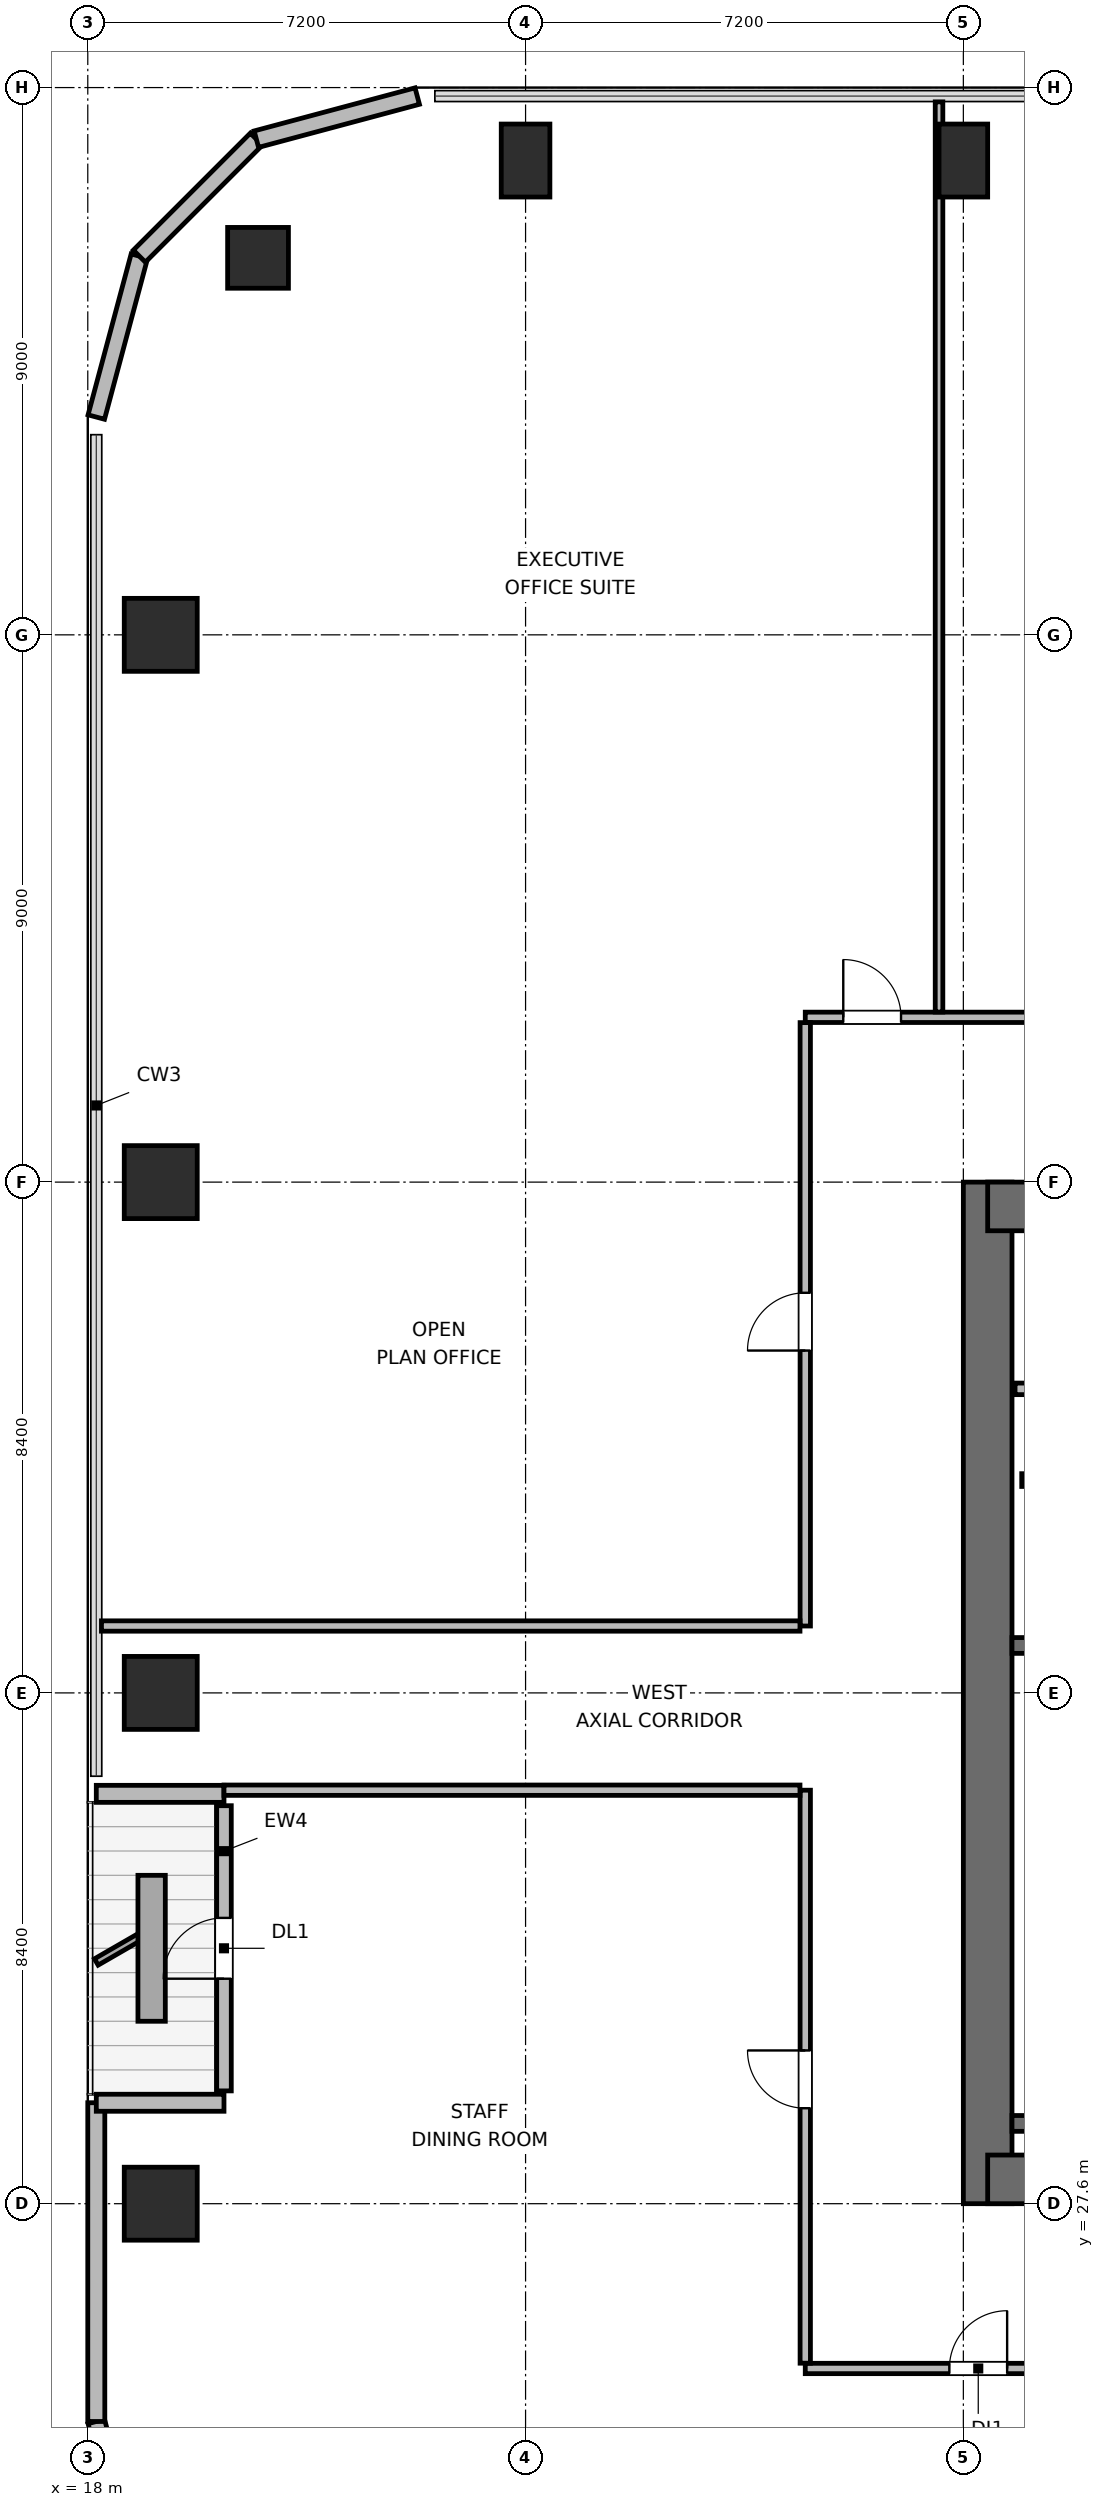
"""IFC4 building model, lengths in metres.
Left out: names, types, materials, properties, quantities, classifications, styles, units other than length and angle.
Written with IfcOpenShell. Run it as: python <this file> out.ifc"""

import sys

from ifc_helpers import new_model, si_unit, direction, frame, frame_2d, origin, origin_2d, place, context, subcontext, project, spatial, rectangle, circle, extrude, element, fill, save


model = new_model("IFC4")
c1 = context("Model", 3, precision=1e-05, world=origin(), true_north=direction((0.0, 1.0)))
c2 = subcontext(c1, "Body", "Model", "MODEL_VIEW")
j1 = project(units=[si_unit("LENGTHUNIT", "METRE"), si_unit("PLANEANGLEUNIT", "RADIAN")], contexts=[c1])
p1 = place(None, origin())
s1 = spatial("IfcSite", under=j1, at=p1, CompositionType="ELEMENT")
p2 = place(p1, origin())
s2 = spatial("IfcBuilding", under=s1, at=p2, CompositionType="ELEMENT")
p3 = place(p2, frame((0.0, 0.0, 162.3)))
s3 = spatial("IfcBuildingStorey", under=s2, at=p3, CompositionType="ELEMENT", Elevation=162.3)
p4 = place(p3, frame((32.8, 27.6, 0.0), z_axis=(0.0, 0.0, 1.0), x_axis=(0.0, 1.0, 0.0)))
e1 = element("IfcWall", 1, at=p4, inside=s3, PredefinedType="SHEAR", context=c2, shape_type="SweptSolid", body=[
    extrude(rectangle(XDim=16.8, YDim=0.8, at=frame_2d((8.4, 0.0))), origin(), (0.0, 0.0, 1.0), 3.9),
])
p5 = place(p3, frame((32.8, 28.0, 0.0), z_axis=(0.0, 0.0, 1.0), x_axis=(1.0, 0.0, 0.0)))
e2 = element("IfcWall", 2, at=p5, inside=s3, PredefinedType="SHEAR", context=c2, shape_type="SweptSolid", body=[
    extrude(rectangle(XDim=9.2, YDim=0.8, at=frame_2d((4.6, 0.0))), origin(), (0.0, 0.0, 1.0), 3.9),
])
p6 = place(p5, frame((5.025, 0.0, 0.0)))
e3 = element("IfcOpeningElement", 3, at=p6, cuts=e2, PredefinedType="OPENING", context=c2, shape_type="SweptSolid", body=[
    extrude(rectangle(XDim=1.05, YDim=2.04, at=frame_2d((0.525, 1.02))), frame((0.0, 0.41, 0.0), z_axis=(0.0, -1.0, 0.0), x_axis=(1.0, 0.0, 0.0)), (0.0, 0.0, 1.0), 0.82),
])
p7 = place(p3, frame((32.8, 44.0, 0.0), z_axis=(0.0, 0.0, 1.0), x_axis=(1.0, 0.0, 0.0)))
e4 = element("IfcWall", 4, at=p7, inside=s3, PredefinedType="SHEAR", context=c2, shape_type="SweptSolid", body=[
    extrude(rectangle(XDim=9.2, YDim=0.8, at=frame_2d((4.6, 0.0))), origin(), (0.0, 0.0, 1.0), 3.9),
])
p8 = place(p7, frame((1.025, 0.0, 0.0)))
e5 = element("IfcOpeningElement", 5, at=p8, cuts=e4, PredefinedType="OPENING", context=c2, shape_type="SweptSolid", body=[
    extrude(rectangle(XDim=0.95, YDim=2.04, at=frame_2d((0.475, 1.02))), frame((0.0, 0.41, 0.0), z_axis=(0.0, -1.0, 0.0), x_axis=(1.0, 0.0, 0.0)), (0.0, 0.0, 1.0), 0.82),
])
p9 = place(p7, frame((4.275, 0.0, 0.0)))
e6 = element("IfcOpeningElement", 6, at=p9, cuts=e4, PredefinedType="OPENING", context=c2, shape_type="SweptSolid", body=[
    extrude(rectangle(XDim=0.9, YDim=2.02, at=frame_2d((0.45, 1.01))), frame((0.0, 0.41, 0.0), z_axis=(0.0, -1.0, 0.0), x_axis=(1.0, 0.0, 0.0)), (0.0, 0.0, 1.0), 0.82),
])
p10 = place(p7, frame((7.175, 0.0, 0.0)))
e7 = element("IfcOpeningElement", 7, at=p10, cuts=e4, PredefinedType="OPENING", context=c2, shape_type="SweptSolid", body=[
    extrude(rectangle(XDim=0.9, YDim=2.02, at=frame_2d((0.45, 1.01))), frame((0.0, 0.41, 0.0), z_axis=(0.0, -1.0, 0.0), x_axis=(1.0, 0.0, 0.0)), (0.0, 0.0, 1.0), 0.82),
])
for number, where, z_axis, x_axis in (
    (8, (33.2, 28.92, 0.0), (0.0, 0.0, 1.0), (1.0, 0.0, 0.0)),
    (9, (33.2, 36.78, 0.0), (0.0, 0.0, 1.0), (1.0, 0.0, 0.0)),
):
    element("IfcWall", number, at=place(p3, frame(where, z_axis=z_axis, x_axis=x_axis)), inside=s3, PredefinedType="SHEAR", context=c2, shape_type="SweptSolid", body=[
        extrude(rectangle(XDim=3.91, YDim=0.26, at=frame_2d((1.955, 0.0))), origin(), (0.0, 0.0, 1.0), 3.9),
    ])
p11 = place(p3, frame((20.8, 59.6, 0.0), z_axis=(0.0, 0.0, 1.0), x_axis=(1.0, 0.0, 0.0)))
e10 = element("IfcColumn", 10, at=p11, inside=s3, PredefinedType="COLUMN", context=c2, shape_type="SweptSolid", body=[
    extrude(circle(Radius=0.5, at=origin_2d()), origin(), (0.0, 0.0, 1.0), 3.9),
])
for number, where, z_axis, x_axis in (
    (11, (25.2, 61.2, 0.0), (0.0, 0.0, 1.0), (1.0, 0.0, 0.0)),
    (12, (32.4, 61.2, 0.0), (0.0, 0.0, 1.0), (1.0, 0.0, 0.0)),
):
    element("IfcColumn", number, at=place(p3, frame(where, z_axis=z_axis, x_axis=x_axis)), inside=s3, PredefinedType="COLUMN", context=c2, shape_type="SweptSolid", body=[
        extrude(rectangle(XDim=0.8, YDim=1.2, at=origin_2d()), origin(), (0.0, 0.0, 1.0), 3.9),
    ])
for number, where, z_axis, x_axis in (
    (13, (19.2, 27.6, 0.0), (0.0, 0.0, 1.0), (1.0, 0.0, 0.0)),
    (14, (19.2, 36.0, 0.0), (0.0, 0.0, 1.0), (1.0, 0.0, 0.0)),
    (15, (19.2, 44.4, 0.0), (0.0, 0.0, 1.0), (1.0, 0.0, 0.0)),
    (16, (19.2, 53.4, 0.0), (0.0, 0.0, 1.0), (1.0, 0.0, 0.0)),
):
    element("IfcColumn", number, at=place(p3, frame(where, z_axis=z_axis, x_axis=x_axis)), inside=s3, PredefinedType="COLUMN", context=c2, shape_type="SweptSolid", body=[
        extrude(rectangle(XDim=1.2, YDim=1.2, at=origin_2d()), origin(), (0.0, 0.0, 1.0), 3.9),
    ])
p12 = place(p3, frame((18.848, 21.373, 0.0), z_axis=(0.0, 0.0, 1.0), x_axis=(-0.258672222976, 0.9659651552, 0.0)))
e17 = element("IfcWall", 17, at=p12, inside=s3, PredefinedType="SOLIDWALL", context=c2, shape_type="SweptSolid", body=[
    extrude(rectangle(XDim=2.739, YDim=0.28, at=frame_2d((1.37, 0.0))), origin(), (0.0, 0.0, 1.0), 3.68),
])
p13 = place(p3, frame((18.14, 24.018, 0.0), z_axis=(0.0, 0.0, 1.0), x_axis=(0.0, 1.0, 0.0)))
e18 = element("IfcWall", 18, at=p13, inside=s3, PredefinedType="SOLIDWALL", context=c2, shape_type="SweptSolid", body=[
    extrude(rectangle(XDim=5.242, YDim=0.28, at=frame_2d((2.621, 0.0))), origin(), (0.0, 0.0, 1.0), 3.68),
])
p14 = place(p3, frame((18.14, 29.26, 0.0), z_axis=(0.0, 0.0, 1.0), x_axis=(1.0, 0.0, 0.0)))
e19 = element("IfcWall", 19, at=p14, inside=s3, PredefinedType="SOLIDWALL", context=c2, shape_type="SweptSolid", body=[
    extrude(rectangle(XDim=2.1, YDim=0.28, at=frame_2d((1.05, 0.0))), origin(), (0.0, 0.0, 1.0), 3.116),
])
p15 = place(p3, frame((20.24, 29.455, 0.0), z_axis=(0.0, 0.0, 1.0), x_axis=(0.0, 1.0, 0.0)))
e20 = element("IfcWall", 20, at=p15, inside=s3, PredefinedType="SOLIDWALL", context=c2, shape_type="SweptSolid", body=[
    extrude(rectangle(XDim=4.69, YDim=0.24, at=frame_2d((2.345, 0.0))), origin(), (0.0, 0.0, 1.0), 3.248),
])
p16 = place(p15, frame((1.845, 0.0, 0.0)))
e21 = element("IfcOpeningElement", 21, at=p16, cuts=e20, PredefinedType="OPENING", context=c2, shape_type="SweptSolid", body=[
    extrude(rectangle(XDim=1.0, YDim=2.02, at=frame_2d((0.5, 1.01))), frame((0.0, 0.13, 0.0), z_axis=(0.0, -1.0, 0.0), x_axis=(1.0, 0.0, 0.0)), (0.0, 0.0, 1.0), 0.26),
])
p17 = place(p3, frame((20.24, 34.34, 0.0), z_axis=(0.0, 0.0, 1.0), x_axis=(-1.0, 0.0, 0.0)))
e22 = element("IfcWall", 22, at=p17, inside=s3, PredefinedType="SOLIDWALL", context=c2, shape_type="SweptSolid", body=[
    extrude(rectangle(XDim=2.1, YDim=0.28, at=frame_2d((1.05, 0.0))), origin(), (0.0, 0.0, 1.0), 3.116),
])
p18 = place(p3, frame((18.14, 56.982, 0.0), z_axis=(0.0, 0.0, 1.0), x_axis=(0.258672222976, 0.9659651552, 0.0)))
e23 = element("IfcWall", 23, at=p18, inside=s3, PredefinedType="SOLIDWALL", context=c2, shape_type="SweptSolid", body=[
    extrude(rectangle(XDim=2.739, YDim=0.28, at=frame_2d((1.37, 0.0))), origin(), (0.0, 0.0, 1.0), 3.68),
])
p19 = place(p3, frame((18.848, 59.627, 0.0), z_axis=(0.0, 0.0, 1.0), x_axis=(0.707106781187, 0.707106781187, 0.0)))
e24 = element("IfcWall", 24, at=p19, inside=s3, PredefinedType="SOLIDWALL", context=c2, shape_type="SweptSolid", body=[
    extrude(rectangle(XDim=2.721, YDim=0.28, at=frame_2d((1.36, 0.0))), origin(), (0.0, 0.0, 1.0), 3.68),
])
p20 = place(p3, frame((20.772, 61.552, 0.0), z_axis=(0.0, 0.0, 1.0), x_axis=(0.965971118627, 0.258649952598, 0.0)))
e25 = element("IfcWall", 25, at=p20, inside=s3, PredefinedType="SOLIDWALL", context=c2, shape_type="SweptSolid", body=[
    extrude(rectangle(XDim=2.739, YDim=0.28, at=frame_2d((1.37, 0.0))), origin(), (0.0, 0.0, 1.0), 3.68),
])
p21 = place(p3, frame((33.25, 41.0, 0.0), z_axis=(0.0, 0.0, 1.0), x_axis=(1.0, 0.0, 0.0)))
e26 = element("IfcWall", 26, at=p21, inside=s3, PredefinedType="PLUMBINGWALL", context=c2, shape_type="SweptSolid", body=[
    extrude(rectangle(XDim=8.3, YDim=0.19, at=frame_2d((4.15, 0.0))), origin(), (0.0, 0.0, 1.0), 3.68),
])
p22 = place(p3, frame((33.36, 39.5, 0.0), z_axis=(0.0, 0.0, 1.0), x_axis=(1.0, 0.0, 0.0)))
e27 = element("IfcWall", 27, at=p22, inside=s3, PredefinedType="PARTITIONING", context=c2, shape_type="SweptSolid", body=[
    extrude(rectangle(XDim=1.86, YDim=0.21, at=frame_2d((0.93, 0.0))), origin(), (0.0, 0.0, 1.0), 3.68),
])
p23 = place(p3, frame((29.8, 24.89, 0.0), z_axis=(0.0, 0.0, 1.0), x_axis=(1.0, 0.0, 0.0)))
e28 = element("IfcWall", 28, at=p23, inside=s3, PredefinedType="PARTITIONING", context=c2, shape_type="SweptSolid", body=[
    extrude(rectangle(XDim=33.8, YDim=0.17, at=frame_2d((16.9, 0.0))), origin(), (0.0, 0.0, 1.0), 3.68),
])
p24 = place(p23, frame((2.37, 0.0, 0.0)))
e29 = element("IfcOpeningElement", 29, at=p24, cuts=e28, PredefinedType="OPENING", context=c2, shape_type="SweptSolid", body=[
    extrude(rectangle(XDim=0.95, YDim=2.04, at=frame_2d((0.475, 1.02))), frame((0.0, 0.095, 0.0), z_axis=(0.0, -1.0, 0.0), x_axis=(1.0, 0.0, 0.0)), (0.0, 0.0, 1.0), 0.19),
])
p25 = place(p23, frame((7.455, 0.0, 0.0)))
e30 = element("IfcOpeningElement", 30, at=p25, cuts=e28, PredefinedType="OPENING", context=c2, shape_type="SweptSolid", body=[
    extrude(rectangle(XDim=0.95, YDim=2.04, at=frame_2d((0.475, 1.02))), frame((0.0, 0.095, 0.0), z_axis=(0.0, -1.0, 0.0), x_axis=(1.0, 0.0, 0.0)), (0.0, 0.0, 1.0), 0.19),
])
p26 = place(p23, frame((11.51, 0.0, 0.0)))
e31 = element("IfcOpeningElement", 31, at=p26, cuts=e28, PredefinedType="OPENING", context=c2, shape_type="SweptSolid", body=[
    extrude(rectangle(XDim=0.95, YDim=2.04, at=frame_2d((0.475, 1.02))), frame((0.0, 0.095, 0.0), z_axis=(0.0, -1.0, 0.0), x_axis=(1.0, 0.0, 0.0)), (0.0, 0.0, 1.0), 0.19),
])
p27 = place(p23, frame((15.995, 0.0, 0.0)))
e32 = element("IfcOpeningElement", 32, at=p27, cuts=e28, PredefinedType="OPENING", context=c2, shape_type="SweptSolid", body=[
    extrude(rectangle(XDim=0.95, YDim=2.04, at=frame_2d((0.475, 1.02))), frame((0.0, 0.095, 0.0), z_axis=(0.0, -1.0, 0.0), x_axis=(1.0, 0.0, 0.0)), (0.0, 0.0, 1.0), 0.19),
])
p28 = place(p23, frame((20.91, 0.0, 0.0)))
e33 = element("IfcOpeningElement", 33, at=p28, cuts=e28, PredefinedType="OPENING", context=c2, shape_type="SweptSolid", body=[
    extrude(rectangle(XDim=0.95, YDim=2.04, at=frame_2d((0.475, 1.02))), frame((0.0, 0.095, 0.0), z_axis=(0.0, -1.0, 0.0), x_axis=(1.0, 0.0, 0.0)), (0.0, 0.0, 1.0), 0.19),
])
p29 = place(p23, frame((25.395, 0.0, 0.0)))
e34 = element("IfcOpeningElement", 34, at=p29, cuts=e28, PredefinedType="OPENING", context=c2, shape_type="SweptSolid", body=[
    extrude(rectangle(XDim=0.95, YDim=2.04, at=frame_2d((0.475, 1.02))), frame((0.0, 0.095, 0.0), z_axis=(0.0, -1.0, 0.0), x_axis=(1.0, 0.0, 0.0)), (0.0, 0.0, 1.0), 0.19),
])
p30 = place(p23, frame((30.48, 0.0, 0.0)))
e35 = element("IfcOpeningElement", 35, at=p30, cuts=e28, PredefinedType="OPENING", context=c2, shape_type="SweptSolid", body=[
    extrude(rectangle(XDim=0.95, YDim=2.04, at=frame_2d((0.475, 1.02))), frame((0.0, 0.095, 0.0), z_axis=(0.0, -1.0, 0.0), x_axis=(1.0, 0.0, 0.0)), (0.0, 0.0, 1.0), 0.19),
])
p31 = place(p3, frame((29.8, 47.11, 0.0), z_axis=(0.0, 0.0, 1.0), x_axis=(1.0, 0.0, 0.0)))
e36 = element("IfcWall", 36, at=p31, inside=s3, PredefinedType="PARTITIONING", context=c2, shape_type="SweptSolid", body=[
    extrude(rectangle(XDim=33.8, YDim=0.17, at=frame_2d((16.9, 0.0))), origin(), (0.0, 0.0, 1.0), 3.68),
])
p32 = place(p31, frame((0.625, 0.0, 0.0)))
e37 = element("IfcOpeningElement", 37, at=p32, cuts=e36, PredefinedType="OPENING", context=c2, shape_type="SweptSolid", body=[
    extrude(rectangle(XDim=0.95, YDim=2.04, at=frame_2d((0.475, 1.02))), frame((0.0, 0.095, 0.0), z_axis=(0.0, -1.0, 0.0), x_axis=(1.0, 0.0, 0.0)), (0.0, 0.0, 1.0), 0.19),
])
p33 = place(p31, frame((6.185, 0.0, 0.0)))
e38 = element("IfcOpeningElement", 38, at=p33, cuts=e36, PredefinedType="OPENING", context=c2, shape_type="SweptSolid", body=[
    extrude(rectangle(XDim=0.95, YDim=2.04, at=frame_2d((0.475, 1.02))), frame((0.0, 0.095, 0.0), z_axis=(0.0, -1.0, 0.0), x_axis=(1.0, 0.0, 0.0)), (0.0, 0.0, 1.0), 0.19),
])
p34 = place(p31, frame((12.465, 0.0, 0.0)))
e39 = element("IfcOpeningElement", 39, at=p34, cuts=e36, PredefinedType="OPENING", context=c2, shape_type="SweptSolid", body=[
    extrude(rectangle(XDim=0.95, YDim=2.04, at=frame_2d((0.475, 1.02))), frame((0.0, 0.095, 0.0), z_axis=(0.0, -1.0, 0.0), x_axis=(1.0, 0.0, 0.0)), (0.0, 0.0, 1.0), 0.19),
])
p35 = place(p31, frame((20.065, 0.0, 0.0)))
e40 = element("IfcOpeningElement", 40, at=p35, cuts=e36, PredefinedType="OPENING", context=c2, shape_type="SweptSolid", body=[
    extrude(rectangle(XDim=0.95, YDim=2.04, at=frame_2d((0.475, 1.02))), frame((0.0, 0.095, 0.0), z_axis=(0.0, -1.0, 0.0), x_axis=(1.0, 0.0, 0.0)), (0.0, 0.0, 1.0), 0.19),
])
p36 = place(p31, frame((29.585, 0.0, 0.0)))
e41 = element("IfcOpeningElement", 41, at=p36, cuts=e36, PredefinedType="OPENING", context=c2, shape_type="SweptSolid", body=[
    extrude(rectangle(XDim=0.95, YDim=2.04, at=frame_2d((0.475, 1.02))), frame((0.0, 0.095, 0.0), z_axis=(0.0, -1.0, 0.0), x_axis=(1.0, 0.0, 0.0)), (0.0, 0.0, 1.0), 0.19),
])
p37 = place(p3, frame((29.8, 24.977, 0.0), z_axis=(0.0, 0.0, 1.0), x_axis=(0.0, 1.0, 0.0)))
e42 = element("IfcWall", 42, at=p37, inside=s3, PredefinedType="PARTITIONING", context=c2, shape_type="SweptSolid", body=[
    extrude(rectangle(XDim=9.423, YDim=0.17, at=frame_2d((4.711, 0.0))), origin(), (0.0, 0.0, 1.0), 3.68),
])
p38 = place(p37, frame((4.193, 0.0, 0.0)))
e43 = element("IfcOpeningElement", 43, at=p38, cuts=e42, PredefinedType="OPENING", context=c2, shape_type="SweptSolid", body=[
    extrude(rectangle(XDim=0.95, YDim=2.04, at=frame_2d((0.475, 1.02))), frame((0.0, 0.095, 0.0), z_axis=(0.0, -1.0, 0.0), x_axis=(1.0, 0.0, 0.0)), (0.0, 0.0, 1.0), 0.19),
])
p39 = place(p3, frame((29.8, 37.1, 0.0), z_axis=(0.0, 0.0, 1.0), x_axis=(0.0, 1.0, 0.0)))
e44 = element("IfcWall", 44, at=p39, inside=s3, PredefinedType="PARTITIONING", context=c2, shape_type="SweptSolid", body=[
    extrude(rectangle(XDim=9.923, YDim=0.17, at=frame_2d((4.961, 0.0))), origin(), (0.0, 0.0, 1.0), 3.68),
])
p40 = place(p39, frame((4.53, 0.0, 0.0)))
e45 = element("IfcOpeningElement", 45, at=p40, cuts=e44, PredefinedType="OPENING", context=c2, shape_type="SweptSolid", body=[
    extrude(rectangle(XDim=0.95, YDim=2.04, at=frame_2d((0.475, 1.02))), frame((0.0, 0.095, 0.0), z_axis=(0.0, -1.0, 0.0), x_axis=(1.0, 0.0, 0.0)), (0.0, 0.0, 1.0), 0.19),
])
p41 = place(p3, frame((32.0, 47.197, 0.0), z_axis=(0.0, 0.0, 1.0), x_axis=(0.0, 1.0, 0.0)))
e46 = element("IfcWall", 46, at=p41, inside=s3, PredefinedType="PARTITIONING", context=c2, shape_type="SweptSolid", body=[
    extrude(rectangle(XDim=14.968, YDim=0.125, at=frame_2d((7.484, 0.0))), origin(), (0.0, 0.0, 1.0), 3.68),
])
p42 = place(p3, frame((20.24, 34.4, 0.0), z_axis=(0.0, 0.0, 1.0), x_axis=(1.0, 0.0, 0.0)))
e47 = element("IfcWall", 47, at=p42, inside=s3, PredefinedType="PARTITIONING", context=c2, shape_type="SweptSolid", body=[
    extrude(rectangle(XDim=9.473, YDim=0.17, at=frame_2d((4.736, 0.0))), origin(), (0.0, 0.0, 1.0), 3.68),
])
p43 = place(p3, frame((18.225, 37.1, 0.0), z_axis=(0.0, 0.0, 1.0), x_axis=(1.0, 0.0, 0.0)))
e48 = element("IfcWall", 48, at=p43, inside=s3, PredefinedType="PARTITIONING", context=c2, shape_type="SweptSolid", body=[
    extrude(rectangle(XDim=11.488, YDim=0.17, at=frame_2d((5.744, 0.0))), origin(), (0.0, 0.0, 1.0), 3.68),
])
p44 = place(p16, origin())
e49 = element("IfcDoor", 49, at=p44, inside=s3, OperationType="SINGLE_SWING_LEFT", PredefinedType="DOOR", context=c2, shape_type="SweptSolid", body=[
    extrude(rectangle(XDim=1.0, YDim=2.02, at=frame_2d((0.5, 1.01))), frame((0.0, 0.025, 0.0), z_axis=(0.0, -1.0, 0.0), x_axis=(1.0, 0.0, 0.0)), (0.0, 0.0, 1.0), 0.05),
])
fill(e21, e49)
p45 = place(p24, origin())
e50 = element("IfcDoor", 50, at=p45, inside=s3, OperationType="SINGLE_SWING_RIGHT", PredefinedType="DOOR", context=c2, shape_type="SweptSolid", body=[
    extrude(rectangle(XDim=0.95, YDim=2.04, at=frame_2d((0.475, 1.02))), frame((0.0, 0.025, 0.0), z_axis=(0.0, -1.0, 0.0), x_axis=(1.0, 0.0, 0.0)), (0.0, 0.0, 1.0), 0.05),
])
fill(e29, e50)
p46 = place(p32, origin())
e51 = element("IfcDoor", 51, at=p46, inside=s3, OperationType="SINGLE_SWING_LEFT", PredefinedType="DOOR", context=c2, shape_type="SweptSolid", body=[
    extrude(rectangle(XDim=0.95, YDim=2.04, at=frame_2d((0.475, 1.02))), frame((0.0, 0.025, 0.0), z_axis=(0.0, -1.0, 0.0), x_axis=(1.0, 0.0, 0.0)), (0.0, 0.0, 1.0), 0.05),
])
fill(e37, e51)
p47 = place(p38, origin())
e52 = element("IfcDoor", 52, at=p47, inside=s3, OperationType="SINGLE_SWING_RIGHT", PredefinedType="DOOR", context=c2, shape_type="SweptSolid", body=[
    extrude(rectangle(XDim=0.95, YDim=2.04, at=frame_2d((0.475, 1.02))), frame((0.0, 0.025, 0.0), z_axis=(0.0, -1.0, 0.0), x_axis=(1.0, 0.0, 0.0)), (0.0, 0.0, 1.0), 0.05),
])
fill(e43, e52)
p48 = place(p40, origin())
e53 = element("IfcDoor", 53, at=p48, inside=s3, OperationType="SINGLE_SWING_LEFT", PredefinedType="DOOR", context=c2, shape_type="SweptSolid", body=[
    extrude(rectangle(XDim=0.95, YDim=2.04, at=frame_2d((0.475, 1.02))), frame((0.0, 0.025, 0.0), z_axis=(0.0, -1.0, 0.0), x_axis=(1.0, 0.0, 0.0)), (0.0, 0.0, 1.0), 0.05),
])
fill(e45, e53)
save(model, sys.argv[1])
